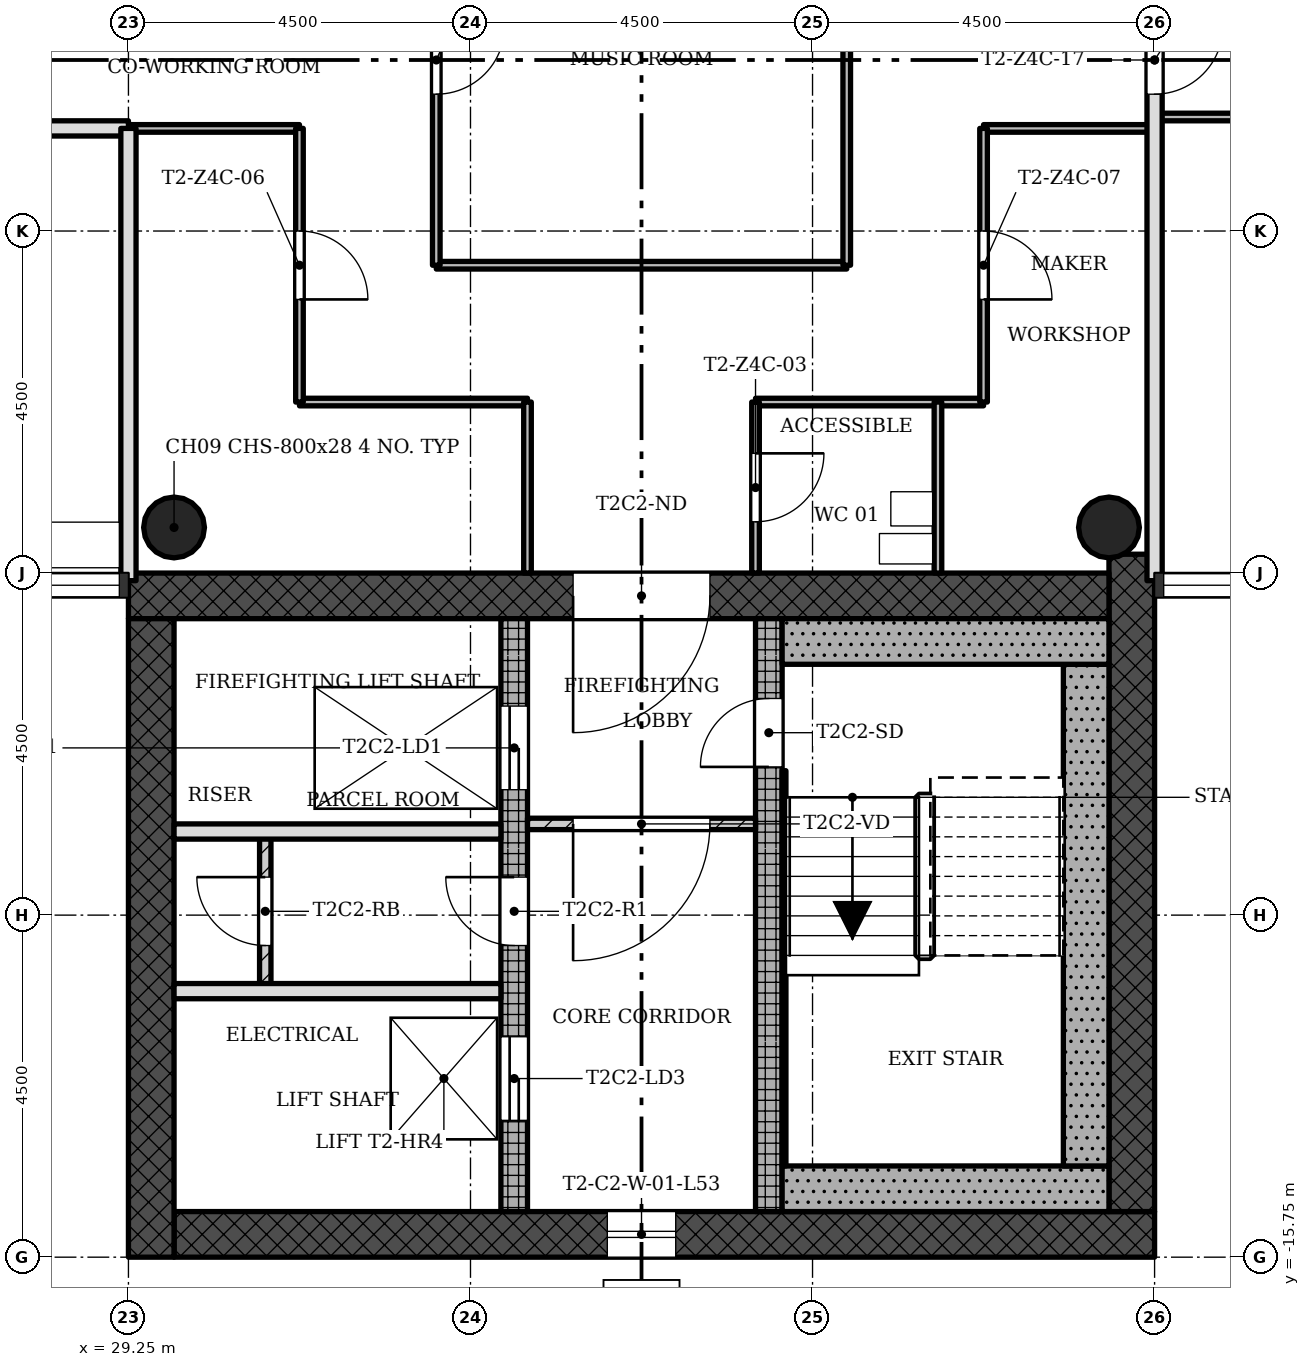
"""IFC4 building model, lengths in metres.
Left out: names, types, materials, properties, quantities, classifications, styles, units other than length and angle.
Written with IfcOpenShell. Run it as: python <this file> out.ifc"""

import sys

from ifc_helpers import new_model, si_unit, direction, frame, frame_2d, origin, origin_2d, place, context, subcontext, project, spatial, rectangle, hollow_circle, extrude, element, fill, save


model = new_model("IFC4")
c1 = context("Model", 3, precision=1e-05, world=origin(), true_north=direction((0.0, 1.0)))
c2 = subcontext(c1, "Body", "Model", "MODEL_VIEW")
j1 = project(units=[si_unit("LENGTHUNIT", "METRE"), si_unit("PLANEANGLEUNIT", "RADIAN")], contexts=[c1])
p1 = place(None, origin())
s1 = spatial("IfcSite", under=j1, at=p1, CompositionType="ELEMENT")
p2 = place(p1, origin())
s2 = spatial("IfcBuilding", under=s1, at=p2, CompositionType="ELEMENT")
p3 = place(p2, frame((0.0, 0.0, 192.6)))
s3 = spatial("IfcBuildingStorey", under=s2, at=p3, CompositionType="ELEMENT", Elevation=192.6)
p4 = place(p3, frame((29.85, -15.45, 0.0), z_axis=(0.0, 0.0, 1.0), x_axis=(1.0, 0.0, 0.0)))
e1 = element("IfcWall", 1, at=p4, inside=s3, PredefinedType="SHEAR", context=c2, shape_type="SweptSolid", body=[
    extrude(rectangle(XDim=12.9, YDim=0.6, at=frame_2d((6.45, 0.0))), origin(), (0.0, 0.0, 1.0), 3.4),
])
p5 = place(p4, frame((5.7, 0.0, 0.45)))
e2 = element("IfcOpeningElement", 2, at=p5, cuts=e1, PredefinedType="OPENING", context=c2, shape_type="SweptSolid", body=[
    extrude(rectangle(XDim=0.9, YDim=2.4, at=frame_2d((0.45, 1.2))), frame((0.0, 0.31, 0.0), z_axis=(0.0, -1.0, 0.0), x_axis=(1.0, 0.0, 0.0)), (0.0, 0.0, 1.0), 0.62),
])
p6 = place(p3, frame((42.45, -15.15, 0.0), z_axis=(0.0, 0.0, 1.0), x_axis=(0.0, 1.0, 0.0)))
e3 = element("IfcWall", 3, at=p6, inside=s3, PredefinedType="SHEAR", context=c2, shape_type="SweptSolid", body=[
    extrude(rectangle(XDim=8.648, YDim=0.6, at=frame_2d((4.324, 0.0))), origin(), (0.0, 0.0, 1.0), 3.4),
])
p7 = place(p3, frame((42.15, -7.05, 0.0), z_axis=(0.0, 0.0, 1.0), x_axis=(-1.0, 0.0, 0.0)))
e4 = element("IfcWall", 4, at=p7, inside=s3, PredefinedType="SHEAR", context=c2, shape_type="SweptSolid", body=[
    extrude(rectangle(XDim=12.9, YDim=0.6, at=frame_2d((6.45, 0.0))), origin(), (0.0, 0.0, 1.0), 3.4),
])
p8 = place(p7, frame((5.25, 0.0, 0.0)))
e5 = element("IfcOpeningElement", 5, at=p8, cuts=e4, PredefinedType="OPENING", context=c2, shape_type="SweptSolid", body=[
    extrude(rectangle(XDim=1.8, YDim=2.1, at=frame_2d((0.9, 1.05))), frame((0.0, 0.31, 0.0), z_axis=(0.0, -1.0, 0.0), x_axis=(1.0, 0.0, 0.0)), (0.0, 0.0, 1.0), 0.62),
])
p9 = place(p3, frame((29.55, -7.35, 0.0), z_axis=(0.0, 0.0, 1.0), x_axis=(0.0, -1.0, 0.0)))
e6 = element("IfcWall", 6, at=p9, inside=s3, PredefinedType="SHEAR", context=c2, shape_type="SweptSolid", body=[
    extrude(rectangle(XDim=8.4, YDim=0.6, at=frame_2d((4.2, 0.0))), origin(), (0.0, 0.0, 1.0), 3.4),
])
p10 = place(p3, frame((34.325, -15.15, 0.0), z_axis=(0.0, 0.0, 1.0), x_axis=(0.0, 1.0, 0.0)))
e7 = element("IfcWall", 7, at=p10, inside=s3, PredefinedType="SHEAR", context=c2, shape_type="SweptSolid", body=[
    extrude(rectangle(XDim=7.8, YDim=0.35, at=frame_2d((3.9, 0.0))), origin(), (0.0, 0.0, 1.0), 3.4),
])
p11 = place(p10, frame((5.55, 0.0, 0.0)))
e8 = element("IfcOpeningElement", 8, at=p11, cuts=e7, PredefinedType="OPENING", context=c2, shape_type="SweptSolid", body=[
    extrude(rectangle(XDim=1.1, YDim=2.1, at=frame_2d((0.55, 1.05))), frame((0.0, 0.185, 0.0), z_axis=(0.0, -1.0, 0.0), x_axis=(1.0, 0.0, 0.0)), (0.0, 0.0, 1.0), 0.37),
])
p12 = place(p10, frame((1.2, 0.0, 0.0)))
e9 = element("IfcOpeningElement", 9, at=p12, cuts=e7, PredefinedType="OPENING", context=c2, shape_type="SweptSolid", body=[
    extrude(rectangle(XDim=1.1, YDim=2.1, at=frame_2d((0.55, 1.05))), frame((0.0, 0.185, 0.0), z_axis=(0.0, -1.0, 0.0), x_axis=(1.0, 0.0, 0.0)), (0.0, 0.0, 1.0), 0.37),
])
p13 = place(p10, frame((3.5, 0.0, 0.0)))
e10 = element("IfcOpeningElement", 10, at=p13, cuts=e7, PredefinedType="OPENING", context=c2, shape_type="SweptSolid", body=[
    extrude(rectangle(XDim=0.9, YDim=2.1, at=frame_2d((0.45, 1.05))), frame((0.0, 0.185, 0.0), z_axis=(0.0, -1.0, 0.0), x_axis=(1.0, 0.0, 0.0)), (0.0, 0.0, 1.0), 0.37),
])
p14 = place(p3, frame((37.675, -15.15, 0.0), z_axis=(0.0, 0.0, 1.0), x_axis=(0.0, 1.0, 0.0)))
e11 = element("IfcWall", 11, at=p14, inside=s3, PredefinedType="SHEAR", context=c2, shape_type="SweptSolid", body=[
    extrude(rectangle(XDim=7.8, YDim=0.35, at=frame_2d((3.9, 0.0))), origin(), (0.0, 0.0, 1.0), 3.4),
])
p15 = place(p14, frame((5.85, 0.0, 0.0)))
e12 = element("IfcOpeningElement", 12, at=p15, cuts=e11, PredefinedType="OPENING", context=c2, shape_type="SweptSolid", body=[
    extrude(rectangle(XDim=0.9, YDim=2.1, at=frame_2d((0.45, 1.05))), frame((0.0, 0.185, 0.0), z_axis=(0.0, -1.0, 0.0), x_axis=(1.0, 0.0, 0.0)), (0.0, 0.0, 1.0), 0.37),
])
for number, where, z_axis, x_axis in (
    (13, (42.15, -6.15, 0.0), (0.0, 0.0, 1.0), (1.0, 0.0, 0.0)),
    (14, (29.85, -6.15, 0.0), (0.0, 0.0, 1.0), (1.0, 0.0, 0.0)),
):
    element("IfcColumn", number, at=place(p3, frame(where, z_axis=z_axis, x_axis=x_axis)), inside=s3, PredefinedType="COLUMN", context=c2, shape_type="SweptSolid", body=[
        extrude(hollow_circle(Radius=0.4, WallThickness=0.028, at=origin_2d()), origin(), (0.0, 0.0, 1.0), 3.4),
    ])
p16 = place(p3, frame((34.5, -10.05, 0.0), z_axis=(0.0, 0.0, 1.0), x_axis=(1.0, 0.0, 0.0)))
e15 = element("IfcWall", 15, at=p16, inside=s3, PredefinedType="PARTITIONING", context=c2, shape_type="SweptSolid", body=[
    extrude(rectangle(XDim=3.0, YDim=0.15, at=frame_2d((1.5, 0.0))), origin(), (0.0, 0.0, 1.0), 3.0),
])
p17 = place(p16, frame((0.6, 0.0, 0.0)))
e16 = element("IfcOpeningElement", 16, at=p17, cuts=e15, PredefinedType="OPENING", context=c2, shape_type="SweptSolid", body=[
    extrude(rectangle(XDim=1.8, YDim=2.1, at=frame_2d((0.9, 1.05))), frame((0.0, 0.085, 0.0), z_axis=(0.0, -1.0, 0.0), x_axis=(1.0, 0.0, 0.0)), (0.0, 0.0, 1.0), 0.17),
])
for number, where, z_axis, x_axis in (
    (17, (29.85, -12.25, 0.0), (0.0, 0.0, 1.0), (1.0, 0.0, 0.0)),
    (18, (29.85, -10.15, 0.0), (0.0, 0.0, 1.0), (1.0, 0.0, 0.0)),
):
    element("IfcWall", number, at=place(p3, frame(where, z_axis=z_axis, x_axis=x_axis)), inside=s3, PredefinedType="SOLIDWALL", context=c2, shape_type="SweptSolid", body=[
        extrude(rectangle(XDim=4.3, YDim=0.2, at=frame_2d((2.15, 0.0))), origin(), (0.0, 0.0, 1.0), 3.0),
    ])
p18 = place(p3, frame((31.05, -10.15, 0.0), z_axis=(0.0, 0.0, 1.0), x_axis=(0.0, -1.0, 0.0)))
e19 = element("IfcWall", 19, at=p18, inside=s3, PredefinedType="PARTITIONING", context=c2, shape_type="SweptSolid", body=[
    extrude(rectangle(XDim=2.1, YDim=0.15, at=frame_2d((1.05, 0.0))), origin(), (0.0, 0.0, 1.0), 3.0),
])
p19 = place(p18, frame((0.6, 0.0, 0.0)))
e20 = element("IfcOpeningElement", 20, at=p19, cuts=e19, PredefinedType="OPENING", context=c2, shape_type="SweptSolid", body=[
    extrude(rectangle(XDim=0.9, YDim=2.1, at=frame_2d((0.45, 1.05))), frame((0.0, 0.085, 0.0), z_axis=(0.0, -1.0, 0.0), x_axis=(1.0, 0.0, 0.0)), (0.0, 0.0, 1.0), 0.17),
])
for number, where, z_axis, x_axis in (
    (21, (40.5, -4.5, 0.0), (0.0, 0.0, 1.0), (-1.0, 0.0, 0.0)),
    (22, (34.5, -4.5, 0.0), (0.0, 0.0, 1.0), (-1.0, 0.0, 0.0)),
):
    element("IfcWall", number, at=place(p3, frame(where, z_axis=z_axis, x_axis=x_axis)), inside=s3, PredefinedType="PARTITIONING", context=c2, shape_type="SweptSolid", body=[
        extrude(rectangle(XDim=3.0, YDim=0.1, at=frame_2d((1.5, 0.0))), origin(), (0.0, 0.0, 1.0), 3.0),
    ])
p20 = place(p3, frame((38.7, -2.7, 0.0), z_axis=(0.0, 0.0, 1.0), x_axis=(-1.0, 0.0, 0.0)))
e23 = element("IfcWall", 23, at=p20, inside=s3, PredefinedType="PARTITIONING", context=c2, shape_type="SweptSolid", body=[
    extrude(rectangle(XDim=5.4, YDim=0.1, at=frame_2d((2.7, 0.0))), origin(), (0.0, 0.0, 1.0), 3.0),
])
for number, where, z_axis, x_axis in (
    (24, (42.75, -0.9, 0.0), (0.0, 0.0, 1.0), (-1.0, 0.0, 0.0)),
    (25, (31.5, -0.9, 0.0), (0.0, 0.0, 1.0), (-1.0, 0.0, 0.0)),
):
    element("IfcWall", number, at=place(p3, frame(where, z_axis=z_axis, x_axis=x_axis)), inside=s3, PredefinedType="PARTITIONING", context=c2, shape_type="SweptSolid", body=[
        extrude(rectangle(XDim=2.25, YDim=0.1, at=frame_2d((1.125, 0.0))), origin(), (0.0, 0.0, 1.0), 3.0),
    ])
p21 = place(p3, frame((29.25, -0.9, 0.0), z_axis=(0.0, 0.0, 1.0), x_axis=(-1.0, 0.0, 0.0)))
e26 = element("IfcWall", 26, at=p21, inside=s3, PredefinedType="SOLIDWALL", context=c2, shape_type="SweptSolid", body=[
    extrude(rectangle(XDim=1.8, YDim=0.2, at=frame_2d((0.9, 0.0))), origin(), (0.0, 0.0, 1.0), 3.0),
])
p22 = place(p3, frame((47.25, -0.75, 0.0), z_axis=(0.0, 0.0, 1.0), x_axis=(-1.0, 0.0, 0.0)))
e27 = element("IfcWall", 27, at=p22, inside=s3, PredefinedType="PARTITIONING", context=c2, shape_type="SweptSolid", body=[
    extrude(rectangle(XDim=4.5, YDim=0.1, at=frame_2d((2.25, 0.0))), origin(), (0.0, 0.0, 1.0), 3.0),
])
p23 = place(p22, frame((1.8, 0.0, 0.0)))
e28 = element("IfcOpeningElement", 28, at=p23, cuts=e27, PredefinedType="OPENING", context=c2, shape_type="SweptSolid", body=[
    extrude(rectangle(XDim=0.9, YDim=2.1, at=frame_2d((0.45, 1.05))), frame((0.0, 0.06, 0.0), z_axis=(0.0, -1.0, 0.0), x_axis=(1.0, 0.0, 0.0)), (0.0, 0.0, 1.0), 0.12),
])
p24 = place(p3, frame((42.75, -6.85, 0.0), z_axis=(0.0, 0.0, 1.0), x_axis=(0.0, 1.0, 0.0)))
e29 = element("IfcWall", 29, at=p24, inside=s3, PredefinedType="SOLIDWALL", context=c2, shape_type="SweptSolid", body=[
    extrude(rectangle(XDim=13.7, YDim=0.2, at=frame_2d((6.85, 0.0))), origin(), (0.0, 0.0, 1.0), 3.0),
])
p25 = place(p24, frame((6.4, 0.0, 0.0)))
e30 = element("IfcOpeningElement", 30, at=p25, cuts=e29, PredefinedType="OPENING", context=c2, shape_type="SweptSolid", body=[
    extrude(rectangle(XDim=0.9, YDim=2.1, at=frame_2d((0.45, 1.05))), frame((0.0, 0.11, 0.0), z_axis=(0.0, -1.0, 0.0), x_axis=(1.0, 0.0, 0.0)), (0.0, 0.0, 1.0), 0.22),
])
p26 = place(p3, frame((40.5, -4.5, 0.0), z_axis=(0.0, 0.0, 1.0), x_axis=(0.0, 1.0, 0.0)))
e31 = element("IfcWall", 31, at=p26, inside=s3, PredefinedType="PARTITIONING", context=c2, shape_type="SweptSolid", body=[
    extrude(rectangle(XDim=3.6, YDim=0.1, at=frame_2d((1.8, 0.0))), origin(), (0.0, 0.0, 1.0), 3.0),
])
p27 = place(p26, frame((1.35, 0.0, 0.0)))
e32 = element("IfcOpeningElement", 32, at=p27, cuts=e31, PredefinedType="OPENING", context=c2, shape_type="SweptSolid", body=[
    extrude(rectangle(XDim=0.9, YDim=2.1, at=frame_2d((0.45, 1.05))), frame((0.0, 0.06, 0.0), z_axis=(0.0, -1.0, 0.0), x_axis=(1.0, 0.0, 0.0)), (0.0, 0.0, 1.0), 0.12),
])
p28 = place(p3, frame((39.9, -6.75, 0.0), z_axis=(0.0, 0.0, 1.0), x_axis=(0.0, 1.0, 0.0)))
e33 = element("IfcWall", 33, at=p28, inside=s3, PredefinedType="PARTITIONING", context=c2, shape_type="SweptSolid", body=[
    extrude(rectangle(XDim=2.25, YDim=0.1, at=frame_2d((1.125, 0.0))), origin(), (0.0, 0.0, 1.0), 3.0),
])
p29 = place(p3, frame((38.7, -2.7, 0.0), z_axis=(0.0, 0.0, 1.0), x_axis=(0.0, 1.0, 0.0)))
e34 = element("IfcWall", 34, at=p29, inside=s3, PredefinedType="PARTITIONING", context=c2, shape_type="SweptSolid", body=[
    extrude(rectangle(XDim=5.4, YDim=0.1, at=frame_2d((2.7, 0.0))), origin(), (0.0, 0.0, 1.0), 3.0),
])
p30 = place(p3, frame((37.5, -6.75, 0.0), z_axis=(0.0, 0.0, 1.0), x_axis=(0.0, 1.0, 0.0)))
e35 = element("IfcWall", 35, at=p30, inside=s3, PredefinedType="PARTITIONING", context=c2, shape_type="SweptSolid", body=[
    extrude(rectangle(XDim=2.25, YDim=0.1, at=frame_2d((1.125, 0.0))), origin(), (0.0, 0.0, 1.0), 3.0),
])
p31 = place(p30, frame((0.675, 0.0, 0.0)))
e36 = element("IfcOpeningElement", 36, at=p31, cuts=e35, PredefinedType="OPENING", context=c2, shape_type="SweptSolid", body=[
    extrude(rectangle(XDim=0.9, YDim=2.1, at=frame_2d((0.45, 1.05))), frame((0.0, 0.06, 0.0), z_axis=(0.0, -1.0, 0.0), x_axis=(1.0, 0.0, 0.0)), (0.0, 0.0, 1.0), 0.12),
])
p32 = place(p3, frame((34.5, -6.75, 0.0), z_axis=(0.0, 0.0, 1.0), x_axis=(0.0, 1.0, 0.0)))
e37 = element("IfcWall", 37, at=p32, inside=s3, PredefinedType="PARTITIONING", context=c2, shape_type="SweptSolid", body=[
    extrude(rectangle(XDim=2.25, YDim=0.1, at=frame_2d((1.125, 0.0))), origin(), (0.0, 0.0, 1.0), 3.0),
])
p33 = place(p3, frame((33.3, -2.7, 0.0), z_axis=(0.0, 0.0, 1.0), x_axis=(0.0, 1.0, 0.0)))
e38 = element("IfcWall", 38, at=p33, inside=s3, PredefinedType="PARTITIONING", context=c2, shape_type="SweptSolid", body=[
    extrude(rectangle(XDim=5.4, YDim=0.1, at=frame_2d((2.7, 0.0))), origin(), (0.0, 0.0, 1.0), 3.0),
])
p34 = place(p33, frame((2.25, 0.0, 0.0)))
e39 = element("IfcOpeningElement", 39, at=p34, cuts=e38, PredefinedType="OPENING", context=c2, shape_type="SweptSolid", body=[
    extrude(rectangle(XDim=0.9, YDim=2.1, at=frame_2d((0.45, 1.05))), frame((0.0, 0.06, 0.0), z_axis=(0.0, -1.0, 0.0), x_axis=(1.0, 0.0, 0.0)), (0.0, 0.0, 1.0), 0.12),
])
p35 = place(p3, frame((31.5, -4.5, 0.0), z_axis=(0.0, 0.0, 1.0), x_axis=(0.0, 1.0, 0.0)))
e40 = element("IfcWall", 40, at=p35, inside=s3, PredefinedType="PARTITIONING", context=c2, shape_type="SweptSolid", body=[
    extrude(rectangle(XDim=3.6, YDim=0.1, at=frame_2d((1.8, 0.0))), origin(), (0.0, 0.0, 1.0), 3.0),
])
p36 = place(p35, frame((1.35, 0.0, 0.0)))
e41 = element("IfcOpeningElement", 41, at=p36, cuts=e40, PredefinedType="OPENING", context=c2, shape_type="SweptSolid", body=[
    extrude(rectangle(XDim=0.9, YDim=2.1, at=frame_2d((0.45, 1.05))), frame((0.0, 0.06, 0.0), z_axis=(0.0, -1.0, 0.0), x_axis=(1.0, 0.0, 0.0)), (0.0, 0.0, 1.0), 0.12),
])
p37 = place(p3, frame((29.25, -6.85, 0.0), z_axis=(0.0, 0.0, 1.0), x_axis=(0.0, 1.0, 0.0)))
e42 = element("IfcWall", 42, at=p37, inside=s3, PredefinedType="SOLIDWALL", context=c2, shape_type="SweptSolid", body=[
    extrude(rectangle(XDim=5.95, YDim=0.2, at=frame_2d((2.975, 0.0))), origin(), (0.0, 0.0, 1.0), 3.0),
])
p38 = place(p3, frame((37.85, -14.85, 0.0), z_axis=(0.0, 0.0, 1.0), x_axis=(1.0, 0.0, 0.0)))
e43 = element("IfcWall", 43, at=p38, inside=s3, PredefinedType="SHEAR", context=c2, shape_type="SweptSolid", body=[
    extrude(rectangle(XDim=4.3, YDim=0.6, at=frame_2d((2.15, 0.0))), origin(), (0.0, 0.0, 1.0), 3.4),
])
p39 = place(p3, frame((41.85, -7.95, 0.0), z_axis=(0.0, 0.0, 1.0), x_axis=(0.0, -1.0, 0.0)))
e44 = element("IfcWall", 44, at=p39, inside=s3, PredefinedType="SHEAR", context=c2, shape_type="SweptSolid", body=[
    extrude(rectangle(XDim=6.6, YDim=0.6, at=frame_2d((3.3, 0.0))), origin(), (0.0, 0.0, 1.0), 3.4),
])
p40 = place(p3, frame((37.85, -7.65, 0.0), z_axis=(0.0, 0.0, 1.0), x_axis=(1.0, 0.0, 0.0)))
e45 = element("IfcWall", 45, at=p40, inside=s3, PredefinedType="SHEAR", context=c2, shape_type="SweptSolid", body=[
    extrude(rectangle(XDim=4.3, YDim=0.6, at=frame_2d((2.15, 0.0))), origin(), (0.0, 0.0, 1.0), 3.4),
])
p41 = place(p3, frame((37.875, -9.35, 0.0), z_axis=(0.0, 0.0, 1.0), x_axis=(0.0, -1.0, 0.0)))
e46 = element("IfcWall", 46, at=p41, inside=s3, PredefinedType="SHEAR", context=c2, shape_type="SweptSolid", body=[
    extrude(rectangle(XDim=5.2, YDim=0.05, at=frame_2d((2.6, 0.0))), origin(), (0.0, 0.0, 1.0), 3.4),
])
p42 = place(p5, origin())
e47 = element("IfcWindow", 47, at=p42, inside=s3, PartitioningType="SINGLE_PANEL", PredefinedType="WINDOW", context=c2, shape_type="SweptSolid", body=[
    extrude(rectangle(XDim=0.9, YDim=2.4, at=frame_2d((0.45, 1.2))), frame((0.0, 0.03, 0.0), z_axis=(0.0, -1.0, 0.0), x_axis=(1.0, 0.0, 0.0)), (0.0, 0.0, 1.0), 0.06),
])
fill(e2, e47)
p43 = place(p17, origin())
e48 = element("IfcDoor", 48, at=p43, inside=s3, OperationType="SINGLE_SWING_LEFT", PredefinedType="DOOR", context=c2, shape_type="SweptSolid", body=[
    extrude(rectangle(XDim=1.8, YDim=2.1, at=frame_2d((0.9, 1.05))), frame((0.0, 0.025, 0.0), z_axis=(0.0, -1.0, 0.0), x_axis=(1.0, 0.0, 0.0)), (0.0, 0.0, 1.0), 0.05),
])
fill(e16, e48)
p44 = place(p19, origin())
e49 = element("IfcDoor", 49, at=p44, inside=s3, OperationType="SINGLE_SWING_LEFT", PredefinedType="DOOR", context=c2, shape_type="SweptSolid", body=[
    extrude(rectangle(XDim=0.9, YDim=2.1, at=frame_2d((0.45, 1.05))), frame((0.0, 0.025, 0.0), z_axis=(0.0, -1.0, 0.0), x_axis=(1.0, 0.0, 0.0)), (0.0, 0.0, 1.0), 0.05),
])
fill(e20, e49)
p45 = place(p34, origin())
e50 = element("IfcDoor", 50, at=p45, inside=s3, OperationType="SINGLE_SWING_RIGHT", PredefinedType="DOOR", context=c2, shape_type="SweptSolid", body=[
    extrude(rectangle(XDim=0.9, YDim=2.1, at=frame_2d((0.45, 1.05))), frame((0.0, 0.025, 0.0), z_axis=(0.0, -1.0, 0.0), x_axis=(1.0, 0.0, 0.0)), (0.0, 0.0, 1.0), 0.05),
])
fill(e39, e50)
p46 = place(p31, origin())
e51 = element("IfcDoor", 51, at=p46, inside=s3, OperationType="SINGLE_SWING_RIGHT", PredefinedType="DOOR", context=c2, shape_type="SweptSolid", body=[
    extrude(rectangle(XDim=0.9, YDim=2.1, at=frame_2d((0.45, 1.05))), frame((0.0, 0.025, 0.0), z_axis=(0.0, -1.0, 0.0), x_axis=(1.0, 0.0, 0.0)), (0.0, 0.0, 1.0), 0.05),
])
fill(e36, e51)
p47 = place(p36, origin())
e52 = element("IfcDoor", 52, at=p47, inside=s3, OperationType="SINGLE_SWING_LEFT", PredefinedType="DOOR", context=c2, shape_type="SweptSolid", body=[
    extrude(rectangle(XDim=0.9, YDim=2.1, at=frame_2d((0.45, 1.05))), frame((0.0, 0.025, 0.0), z_axis=(0.0, -1.0, 0.0), x_axis=(1.0, 0.0, 0.0)), (0.0, 0.0, 1.0), 0.05),
])
fill(e41, e52)
p48 = place(p27, origin())
e53 = element("IfcDoor", 53, at=p48, inside=s3, OperationType="SINGLE_SWING_LEFT", PredefinedType="DOOR", context=c2, shape_type="SweptSolid", body=[
    extrude(rectangle(XDim=0.9, YDim=2.1, at=frame_2d((0.45, 1.05))), frame((0.0, 0.025, 0.0), z_axis=(0.0, -1.0, 0.0), x_axis=(1.0, 0.0, 0.0)), (0.0, 0.0, 1.0), 0.05),
])
fill(e32, e53)
p49 = place(p25, origin())
e54 = element("IfcDoor", 54, at=p49, inside=s3, OperationType="SINGLE_SWING_RIGHT", PredefinedType="DOOR", context=c2, shape_type="SweptSolid", body=[
    extrude(rectangle(XDim=0.9, YDim=2.1, at=frame_2d((0.45, 1.05))), frame((0.0, 0.025, 0.0), z_axis=(0.0, -1.0, 0.0), x_axis=(1.0, 0.0, 0.0)), (0.0, 0.0, 1.0), 0.05),
])
fill(e30, e54)
p50 = place(p15, origin())
e55 = element("IfcDoor", 55, at=p50, inside=s3, OperationType="SINGLE_SWING_RIGHT", PredefinedType="DOOR", context=c2, shape_type="SweptSolid", body=[
    extrude(rectangle(XDim=0.9, YDim=2.1, at=frame_2d((0.45, 1.05))), frame((0.0, 0.025, 0.0), z_axis=(0.0, -1.0, 0.0), x_axis=(1.0, 0.0, 0.0)), (0.0, 0.0, 1.0), 0.05),
])
fill(e12, e55)
p51 = place(p11, origin())
e56 = element("IfcDoor", 56, at=p51, inside=s3, OperationType="SLIDING_TO_LEFT", PredefinedType="DOOR", context=c2, shape_type="SweptSolid", body=[
    extrude(rectangle(XDim=1.1, YDim=2.1, at=frame_2d((0.55, 1.05))), frame((0.0, 0.025, 0.0), z_axis=(0.0, -1.0, 0.0), x_axis=(1.0, 0.0, 0.0)), (0.0, 0.0, 1.0), 0.05),
])
fill(e8, e56)
p52 = place(p12, origin())
e57 = element("IfcDoor", 57, at=p52, inside=s3, OperationType="SLIDING_TO_LEFT", PredefinedType="DOOR", context=c2, shape_type="SweptSolid", body=[
    extrude(rectangle(XDim=1.1, YDim=2.1, at=frame_2d((0.55, 1.05))), frame((0.0, 0.025, 0.0), z_axis=(0.0, -1.0, 0.0), x_axis=(1.0, 0.0, 0.0)), (0.0, 0.0, 1.0), 0.05),
])
fill(e9, e57)
p53 = place(p13, origin())
e58 = element("IfcDoor", 58, at=p53, inside=s3, OperationType="SINGLE_SWING_LEFT", PredefinedType="DOOR", context=c2, shape_type="SweptSolid", body=[
    extrude(rectangle(XDim=0.9, YDim=2.1, at=frame_2d((0.45, 1.05))), frame((0.0, 0.025, 0.0), z_axis=(0.0, -1.0, 0.0), x_axis=(1.0, 0.0, 0.0)), (0.0, 0.0, 1.0), 0.05),
])
fill(e10, e58)
p54 = place(p8, origin())
e59 = element("IfcDoor", 59, at=p54, inside=s3, OperationType="SINGLE_SWING_LEFT", PredefinedType="DOOR", context=c2, shape_type="SweptSolid", body=[
    extrude(rectangle(XDim=1.8, YDim=2.1, at=frame_2d((0.9, 1.05))), frame((0.0, 0.025, 0.0), z_axis=(0.0, -1.0, 0.0), x_axis=(1.0, 0.0, 0.0)), (0.0, 0.0, 1.0), 0.05),
])
fill(e5, e59)
save(model, sys.argv[1])
